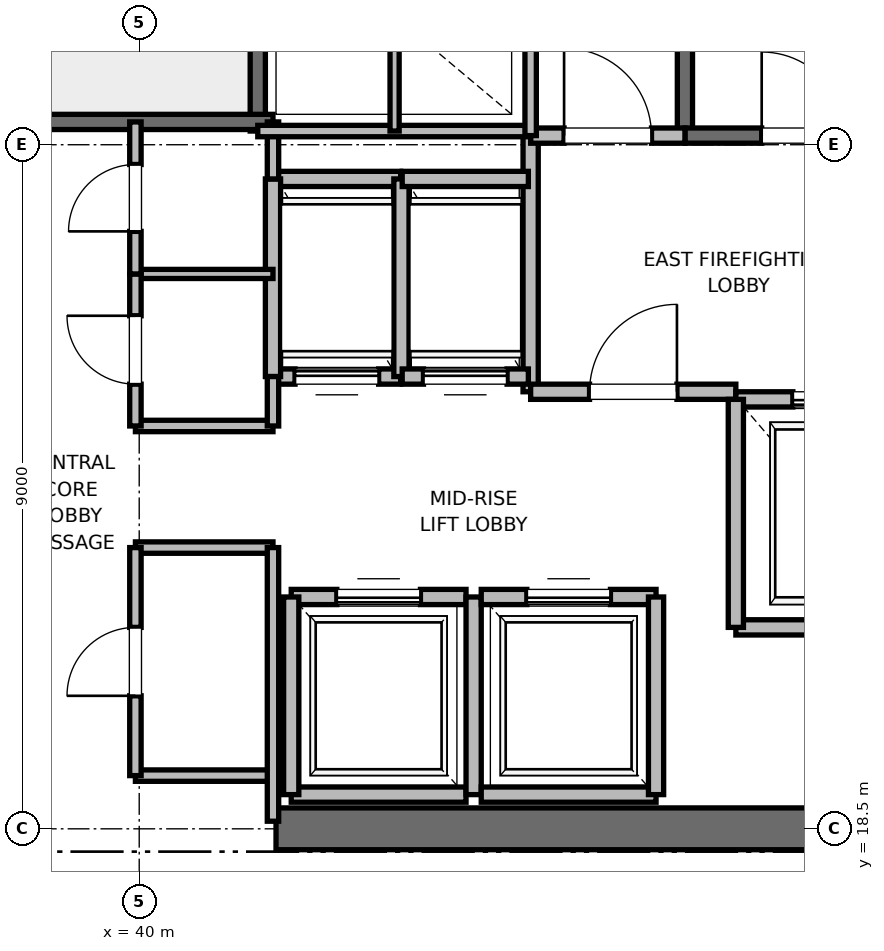
"""IFC4 building model, lengths in metres.
Left out: names, types, materials, properties, quantities, classifications, styles, units other than length and angle.
Written with IfcOpenShell. Run it as: python <this file> out.ifc"""

import sys

from ifc_helpers import new_model, si_unit, direction, frame, frame_2d, origin, place, context, subcontext, project, spatial, rectangle, extrude, element, fill, save


model = new_model("IFC4")
c1 = context("Model", 3, precision=1e-05, world=origin(), true_north=direction((0.0, 1.0)))
c2 = subcontext(c1, "Body", "Model", "MODEL_VIEW")
j1 = project(units=[si_unit("LENGTHUNIT", "METRE"), si_unit("PLANEANGLEUNIT", "RADIAN")], contexts=[c1])
p1 = place(None, origin())
s1 = spatial("IfcSite", under=j1, at=p1, CompositionType="ELEMENT")
p2 = place(p1, origin())
s2 = spatial("IfcBuilding", under=s1, at=p2, CompositionType="ELEMENT")
p3 = place(p2, frame((0.0, 0.0, 205.2)))
s3 = spatial("IfcBuildingStorey", under=s2, at=p3, CompositionType="ELEMENT", Elevation=205.2)
p4 = place(p3, frame((41.8, 18.5, 0.0), z_axis=(0.0, 0.0, 1.0), x_axis=(1.0, 0.0, 0.0)))
e1 = element("IfcWall", 1, at=p4, inside=s3, PredefinedType="SHEAR", context=c2, shape_type="SweptSolid", body=[
    extrude(rectangle(XDim=9.2, YDim=0.55, at=frame_2d((4.6, 0.0))), origin(), (0.0, 0.0, 1.0), 3.775),
])
p5 = place(p3, frame((47.18, 27.62, 0.0), z_axis=(0.0, 0.0, 1.0), x_axis=(0.0, 1.0, 0.0)))
e2 = element("IfcWall", 2, at=p5, inside=s3, PredefinedType="SOLIDWALL", context=c2, shape_type="SweptSolid", body=[
    extrude(rectangle(XDim=8.18, YDim=0.2, at=frame_2d((4.09, 0.0))), origin(), (0.0, 0.0, 1.0), 3.775),
])
p6 = place(p3, frame((47.18, 27.62, 0.0), z_axis=(0.0, 0.0, 1.0), x_axis=(1.0, 0.0, 0.0)))
e3 = element("IfcWall", 3, at=p6, inside=s3, PredefinedType="SOLIDWALL", context=c2, shape_type="SweptSolid", body=[
    extrude(rectangle(XDim=3.12, YDim=0.2, at=frame_2d((1.56, 0.0))), origin(), (0.0, 0.0, 1.0), 3.775),
])
p7 = place(p6, frame((1.01, 0.0, 0.0)))
e4 = element("IfcOpeningElement", 4, at=p7, cuts=e3, PredefinedType="OPENING", context=c2, shape_type="SweptSolid", body=[
    extrude(rectangle(XDim=1.1, YDim=2.15, at=frame_2d((0.55, 1.075))), frame((0.0, 0.1, 0.0), z_axis=(0.0, -1.0, 0.0), x_axis=(1.0, 0.0, 0.0)), (0.0, 0.0, 1.0), 0.2),
])
p8 = place(p3, frame((41.56, 27.68, 0.0), z_axis=(0.0, 0.0, 1.0), x_axis=(0.0, 1.0, 0.0)))
e5 = element("IfcWall", 5, at=p8, inside=s3, PredefinedType="SOLIDWALL", context=c2, shape_type="SweptSolid", body=[
    extrude(rectangle(XDim=8.57, YDim=0.2, at=frame_2d((4.285, 0.0))), origin(), (0.0, 0.0, 1.0), 3.775),
])
p9 = place(p3, frame((38.44, 27.8, 0.0), z_axis=(0.0, 0.0, 1.0), x_axis=(1.0, 0.0, 0.0)))
e6 = element("IfcWall", 6, at=p9, inside=s3, PredefinedType="SOLIDWALL", context=c2, shape_type="SweptSolid", body=[
    extrude(rectangle(XDim=3.32, YDim=0.2, at=frame_2d((1.66, 0.0))), origin(), (0.0, 0.0, 1.0), 3.775),
])
p10 = place(p3, frame((45.15, 24.25, 0.0), z_axis=(0.0, 0.0, 1.0), x_axis=(0.0, 1.0, 0.0)))
e7 = element("IfcWall", 7, at=p10, inside=s3, PredefinedType="PARTITIONING", context=c2, shape_type="SweptSolid", body=[
    extrude(rectangle(XDim=3.37, YDim=0.2, at=frame_2d((1.685, 0.0))), origin(), (0.0, 0.0, 1.0), 3.775),
])
p11 = place(p3, frame((45.15, 24.25, 0.0), z_axis=(0.0, 0.0, 1.0), x_axis=(1.0, 0.0, 0.0)))
e8 = element("IfcWall", 8, at=p11, inside=s3, PredefinedType="PARTITIONING", context=c2, shape_type="SweptSolid", body=[
    extrude(rectangle(XDim=2.7, YDim=0.2, at=frame_2d((1.35, 0.0))), origin(), (0.0, 0.0, 1.0), 3.775),
])
p12 = place(p11, frame((0.775, 0.0, 0.0)))
e9 = element("IfcOpeningElement", 9, at=p12, cuts=e8, PredefinedType="OPENING", context=c2, shape_type="SweptSolid", body=[
    extrude(rectangle(XDim=1.15, YDim=2.2, at=frame_2d((0.575, 1.1))), frame((0.0, 0.1, 0.0), z_axis=(0.0, -1.0, 0.0), x_axis=(1.0, 0.0, 0.0)), (0.0, 0.0, 1.0), 0.2),
])
p13 = place(p3, frame((45.15, 27.62, 0.0), z_axis=(0.0, 0.0, 1.0), x_axis=(1.0, 0.0, 0.0)))
e10 = element("IfcWall", 10, at=p13, inside=s3, PredefinedType="PARTITIONING", context=c2, shape_type="SweptSolid", body=[
    extrude(rectangle(XDim=2.03, YDim=0.2, at=frame_2d((1.015, 0.0))), origin(), (0.0, 0.0, 1.0), 3.775),
])
p14 = place(p13, frame((0.44, 0.0, 0.0)))
e11 = element("IfcOpeningElement", 11, at=p14, cuts=e10, PredefinedType="OPENING", context=c2, shape_type="SweptSolid", body=[
    extrude(rectangle(XDim=1.15, YDim=2.2, at=frame_2d((0.575, 1.1))), frame((0.0, 0.1, 0.0), z_axis=(0.0, -1.0, 0.0), x_axis=(1.0, 0.0, 0.0)), (0.0, 0.0, 1.0), 0.2),
])
p15 = place(p3, frame((47.85, 21.15, 0.0), z_axis=(0.0, 0.0, 1.0), x_axis=(1.0, 0.0, 0.0)))
e12 = element("IfcWall", 12, at=p15, inside=s3, PredefinedType="SOLIDWALL", context=c2, shape_type="SweptSolid", body=[
    extrude(rectangle(XDim=2.6, YDim=0.2, at=frame_2d((1.3, 0.0))), origin(), (0.0, 0.0, 1.0), 3.775),
])
p16 = place(p3, frame((50.45, 24.15, 0.0), z_axis=(0.0, 0.0, 1.0), x_axis=(-1.0, 0.0, 0.0)))
e13 = element("IfcWall", 13, at=p16, inside=s3, PredefinedType="SOLIDWALL", context=c2, shape_type="SweptSolid", body=[
    extrude(rectangle(XDim=2.6, YDim=0.2, at=frame_2d((1.3, 0.0))), origin(), (0.0, 0.0, 1.0), 2.755),
])
p17 = place(p16, frame((0.75, 0.0, 0.0)))
e14 = element("IfcOpeningElement", 14, at=p17, cuts=e13, PredefinedType="OPENING", context=c2, shape_type="SweptSolid", body=[
    extrude(rectangle(XDim=1.1, YDim=2.2, at=frame_2d((0.55, 1.1))), frame((0.0, 0.1, 0.0), z_axis=(0.0, -1.0, 0.0), x_axis=(1.0, 0.0, 0.0)), (0.0, 0.0, 1.0), 0.2),
])
p18 = place(p3, frame((47.85, 24.15, 0.0), z_axis=(0.0, 0.0, 1.0), x_axis=(0.0, -1.0, 0.0)))
e15 = element("IfcWall", 15, at=p18, inside=s3, PredefinedType="SOLIDWALL", context=c2, shape_type="SweptSolid", body=[
    extrude(rectangle(XDim=3.0, YDim=0.2, at=frame_2d((1.5, 0.0))), origin(), (0.0, 0.0, 1.0), 3.775),
])
p19 = place(p3, frame((42.0, 18.95, 0.0), z_axis=(0.0, 0.0, 1.0), x_axis=(1.0, 0.0, 0.0)))
e16 = element("IfcWall", 16, at=p19, inside=s3, PredefinedType="SOLIDWALL", context=c2, shape_type="SweptSolid", body=[
    extrude(rectangle(XDim=2.3, YDim=0.2, at=frame_2d((1.15, 0.0))), origin(), (0.0, 0.0, 1.0), 2.755),
])
p20 = place(p3, frame((44.3, 21.55, 0.0), z_axis=(0.0, 0.0, 1.0), x_axis=(-1.0, 0.0, 0.0)))
e17 = element("IfcWall", 17, at=p20, inside=s3, PredefinedType="SOLIDWALL", context=c2, shape_type="SweptSolid", body=[
    extrude(rectangle(XDim=2.3, YDim=0.2, at=frame_2d((1.15, 0.0))), origin(), (0.0, 0.0, 1.0), 3.775),
])
p21 = place(p20, frame((0.6, 0.0, 0.0)))
e18 = element("IfcOpeningElement", 18, at=p21, cuts=e17, PredefinedType="OPENING", context=c2, shape_type="SweptSolid", body=[
    extrude(rectangle(XDim=1.1, YDim=2.2, at=frame_2d((0.55, 1.1))), frame((0.0, 0.1, 0.0), z_axis=(0.0, -1.0, 0.0), x_axis=(1.0, 0.0, 0.0)), (0.0, 0.0, 1.0), 0.2),
])
p22 = place(p3, frame((42.0, 21.55, 0.0), z_axis=(0.0, 0.0, 1.0), x_axis=(0.0, -1.0, 0.0)))
e19 = element("IfcWall", 19, at=p22, inside=s3, PredefinedType="SOLIDWALL", context=c2, shape_type="SweptSolid", body=[
    extrude(rectangle(XDim=2.6, YDim=0.2, at=frame_2d((1.3, 0.0))), origin(), (0.0, 0.0, 1.0), 2.755),
])
p23 = place(p3, frame((44.4, 18.95, 0.0), z_axis=(0.0, 0.0, 1.0), x_axis=(0.0, 1.0, 0.0)))
e20 = element("IfcWall", 20, at=p23, inside=s3, PredefinedType="SOLIDWALL", context=c2, shape_type="SweptSolid", body=[
    extrude(rectangle(XDim=2.6, YDim=0.2, at=frame_2d((1.3, 0.0))), origin(), (0.0, 0.0, 1.0), 3.775),
])
p24 = place(p3, frame((44.5, 18.95, 0.0), z_axis=(0.0, 0.0, 1.0), x_axis=(1.0, 0.0, 0.0)))
e21 = element("IfcWall", 21, at=p24, inside=s3, PredefinedType="SOLIDWALL", context=c2, shape_type="SweptSolid", body=[
    extrude(rectangle(XDim=2.3, YDim=0.2, at=frame_2d((1.15, 0.0))), origin(), (0.0, 0.0, 1.0), 3.775),
])
p25 = place(p3, frame((46.8, 21.55, 0.0), z_axis=(0.0, 0.0, 1.0), x_axis=(-1.0, 0.0, 0.0)))
e22 = element("IfcWall", 22, at=p25, inside=s3, PredefinedType="SOLIDWALL", context=c2, shape_type="SweptSolid", body=[
    extrude(rectangle(XDim=2.3, YDim=0.2, at=frame_2d((1.15, 0.0))), origin(), (0.0, 0.0, 1.0), 3.775),
])
p26 = place(p25, frame((0.6, 0.0, 0.0)))
e23 = element("IfcOpeningElement", 23, at=p26, cuts=e22, PredefinedType="OPENING", context=c2, shape_type="SweptSolid", body=[
    extrude(rectangle(XDim=1.1, YDim=2.2, at=frame_2d((0.55, 1.1))), frame((0.0, 0.1, 0.0), z_axis=(0.0, -1.0, 0.0), x_axis=(1.0, 0.0, 0.0)), (0.0, 0.0, 1.0), 0.2),
])
p27 = place(p3, frame((46.8, 18.95, 0.0), z_axis=(0.0, 0.0, 1.0), x_axis=(0.0, 1.0, 0.0)))
e24 = element("IfcWall", 24, at=p27, inside=s3, PredefinedType="SOLIDWALL", context=c2, shape_type="SweptSolid", body=[
    extrude(rectangle(XDim=2.6, YDim=0.2, at=frame_2d((1.3, 0.0))), origin(), (0.0, 0.0, 1.0), 3.775),
])
p28 = place(p3, frame((41.76, 24.45, 0.0), z_axis=(0.0, 0.0, 1.0), x_axis=(1.0, 0.0, 0.0)))
e25 = element("IfcWall", 25, at=p28, inside=s3, PredefinedType="SOLIDWALL", context=c2, shape_type="SweptSolid", body=[
    extrude(rectangle(XDim=1.68, YDim=0.2, at=frame_2d((0.84, 0.0))), origin(), (0.0, 0.0, 1.0), 3.775),
])
p29 = place(p28, frame((0.29, 0.0, 0.0)))
e26 = element("IfcOpeningElement", 26, at=p29, cuts=e25, PredefinedType="OPENING", context=c2, shape_type="SweptSolid", body=[
    extrude(rectangle(XDim=1.1, YDim=2.2, at=frame_2d((0.55, 1.1))), frame((0.0, 0.1, 0.0), z_axis=(0.0, -1.0, 0.0), x_axis=(1.0, 0.0, 0.0)), (0.0, 0.0, 1.0), 0.2),
])
p30 = place(p3, frame((43.44, 27.05, 0.0), z_axis=(0.0, 0.0, 1.0), x_axis=(-1.0, 0.0, 0.0)))
e27 = element("IfcWall", 27, at=p30, inside=s3, PredefinedType="SOLIDWALL", context=c2, shape_type="SweptSolid", body=[
    extrude(rectangle(XDim=1.68, YDim=0.2, at=frame_2d((0.84, 0.0))), origin(), (0.0, 0.0, 1.0), 3.775),
])
for number, where, z_axis, x_axis in (
    (28, (41.76, 27.05, 0.0), (0.0, 0.0, 1.0), (0.0, -1.0, 0.0)),
    (29, (43.45, 24.45, 0.0), (0.0, 0.0, 1.0), (0.0, 1.0, 0.0)),
):
    element("IfcWall", number, at=place(p3, frame(where, z_axis=z_axis, x_axis=x_axis)), inside=s3, PredefinedType="SOLIDWALL", context=c2, shape_type="SweptSolid", body=[
        extrude(rectangle(XDim=2.6, YDim=0.2, at=frame_2d((1.3, 0.0))), origin(), (0.0, 0.0, 1.0), 3.775),
    ])
p31 = place(p3, frame((43.46, 24.45, 0.0), z_axis=(0.0, 0.0, 1.0), x_axis=(1.0, 0.0, 0.0)))
e30 = element("IfcWall", 30, at=p31, inside=s3, PredefinedType="SOLIDWALL", context=c2, shape_type="SweptSolid", body=[
    extrude(rectangle(XDim=1.66, YDim=0.2, at=frame_2d((0.83, 0.0))), origin(), (0.0, 0.0, 1.0), 3.775),
])
p32 = place(p31, frame((0.28, 0.0, 0.0)))
e31 = element("IfcOpeningElement", 31, at=p32, cuts=e30, PredefinedType="OPENING", context=c2, shape_type="SweptSolid", body=[
    extrude(rectangle(XDim=1.1, YDim=2.2, at=frame_2d((0.55, 1.1))), frame((0.0, 0.1, 0.0), z_axis=(0.0, -1.0, 0.0), x_axis=(1.0, 0.0, 0.0)), (0.0, 0.0, 1.0), 0.2),
])
p33 = place(p3, frame((45.12, 27.05, 0.0), z_axis=(0.0, 0.0, 1.0), x_axis=(-1.0, 0.0, 0.0)))
e32 = element("IfcWall", 32, at=p33, inside=s3, PredefinedType="SOLIDWALL", context=c2, shape_type="SweptSolid", body=[
    extrude(rectangle(XDim=1.66, YDim=0.2, at=frame_2d((0.83, 0.0))), origin(), (0.0, 0.0, 1.0), 3.775),
])
for number, where, z_axis, x_axis in (
    (33, (39.95, 19.2, 0.0), (0.0, 0.0, 1.0), (1.0, 0.0, 0.0)),
    (34, (39.95, 22.2, 0.0), (0.0, 0.0, 1.0), (1.0, 0.0, 0.0)),
    (35, (39.95, 23.8, 0.0), (0.0, 0.0, 1.0), (1.0, 0.0, 0.0)),
):
    element("IfcWall", number, at=place(p3, frame(where, z_axis=z_axis, x_axis=x_axis)), inside=s3, PredefinedType="PARTITIONING", context=c2, shape_type="SweptSolid", body=[
        extrude(rectangle(XDim=1.81, YDim=0.15, at=frame_2d((0.905, 0.0))), origin(), (0.0, 0.0, 1.0), 2.85),
    ])
p34 = place(p3, frame((39.95, 25.8, 0.0), z_axis=(0.0, 0.0, 1.0), x_axis=(1.0, 0.0, 0.0)))
e36 = element("IfcWall", 36, at=p34, inside=s3, PredefinedType="PARTITIONING", context=c2, shape_type="SweptSolid", body=[
    extrude(rectangle(XDim=1.81, YDim=0.12, at=frame_2d((0.905, 0.0))), origin(), (0.0, 0.0, 1.0), 2.85),
])
p35 = place(p3, frame((41.76, 18.6, 0.0), z_axis=(0.0, 0.0, 1.0), x_axis=(0.0, 1.0, 0.0)))
e37 = element("IfcWall", 37, at=p35, inside=s3, PredefinedType="PARTITIONING", context=c2, shape_type="SweptSolid", body=[
    extrude(rectangle(XDim=3.6, YDim=0.15, at=frame_2d((1.8, 0.0))), origin(), (0.0, 0.0, 1.0), 2.755),
])
p36 = place(p3, frame((41.76, 23.8, 0.0), z_axis=(0.0, 0.0, 1.0), x_axis=(0.0, 1.0, 0.0)))
e38 = element("IfcWall", 38, at=p36, inside=s3, PredefinedType="PARTITIONING", context=c2, shape_type="SweptSolid", body=[
    extrude(rectangle(XDim=0.65, YDim=0.15, at=frame_2d((0.325, 0.0))), origin(), (0.0, 0.0, 1.0), 2.85),
])
p37 = place(p3, frame((41.76, 27.05, 0.0), z_axis=(0.0, 0.0, 1.0), x_axis=(0.0, 1.0, 0.0)))
e39 = element("IfcWall", 39, at=p37, inside=s3, PredefinedType="PARTITIONING", context=c2, shape_type="SweptSolid", body=[
    extrude(rectangle(XDim=0.75, YDim=0.15, at=frame_2d((0.375, 0.0))), origin(), (0.0, 0.0, 1.0), 2.85),
])
p38 = place(p3, frame((39.95, 19.2, 0.0), z_axis=(0.0, 0.0, 1.0), x_axis=(0.0, 1.0, 0.0)))
e40 = element("IfcWall", 40, at=p38, inside=s3, PredefinedType="PARTITIONING", context=c2, shape_type="SweptSolid", body=[
    extrude(rectangle(XDim=3.0, YDim=0.15, at=frame_2d((1.5, 0.0))), origin(), (0.0, 0.0, 1.0), 2.85),
])
p39 = place(p38, frame((1.05, 0.0, 0.0)))
e41 = element("IfcOpeningElement", 41, at=p39, cuts=e40, PredefinedType="OPENING", context=c2, shape_type="SweptSolid", body=[
    extrude(rectangle(XDim=0.9, YDim=2.1, at=frame_2d((0.45, 1.05))), frame((0.0, 0.075, 0.0), z_axis=(0.0, -1.0, 0.0), x_axis=(1.0, 0.0, 0.0)), (0.0, 0.0, 1.0), 0.15),
])
p40 = place(p3, frame((39.95, 23.8, 0.0), z_axis=(0.0, 0.0, 1.0), x_axis=(0.0, 1.0, 0.0)))
e42 = element("IfcWall", 42, at=p40, inside=s3, PredefinedType="PARTITIONING", context=c2, shape_type="SweptSolid", body=[
    extrude(rectangle(XDim=2.0, YDim=0.15, at=frame_2d((1.0, 0.0))), origin(), (0.0, 0.0, 1.0), 2.85),
])
p41 = place(p40, frame((0.55, 0.0, 0.0)))
e43 = element("IfcOpeningElement", 43, at=p41, cuts=e42, PredefinedType="OPENING", context=c2, shape_type="SweptSolid", body=[
    extrude(rectangle(XDim=0.9, YDim=2.1, at=frame_2d((0.45, 1.05))), frame((0.0, 0.075, 0.0), z_axis=(0.0, -1.0, 0.0), x_axis=(1.0, 0.0, 0.0)), (0.0, 0.0, 1.0), 0.15),
])
p42 = place(p3, frame((39.95, 25.8, 0.0), z_axis=(0.0, 0.0, 1.0), x_axis=(0.0, 1.0, 0.0)))
e44 = element("IfcWall", 44, at=p42, inside=s3, PredefinedType="PARTITIONING", context=c2, shape_type="SweptSolid", body=[
    extrude(rectangle(XDim=2.0, YDim=0.15, at=frame_2d((1.0, 0.0))), origin(), (0.0, 0.0, 1.0), 2.85),
])
p43 = place(p42, frame((0.56, 0.0, 0.0)))
e45 = element("IfcOpeningElement", 45, at=p43, cuts=e44, PredefinedType="OPENING", context=c2, shape_type="SweptSolid", body=[
    extrude(rectangle(XDim=0.88, YDim=2.1, at=frame_2d((0.44, 1.05))), frame((0.0, 0.075, 0.0), z_axis=(0.0, -1.0, 0.0), x_axis=(1.0, 0.0, 0.0)), (0.0, 0.0, 1.0), 0.15),
])
p44 = place(p3, frame((41.56, 27.68, 0.0), z_axis=(0.0, 0.0, 1.0), x_axis=(1.0, 0.0, 0.0)))
e46 = element("IfcWall", 46, at=p44, inside=s3, PredefinedType="PARTITIONING", context=c2, shape_type="SweptSolid", body=[
    extrude(rectangle(XDim=3.59, YDim=0.15, at=frame_2d((1.795, 0.0))), origin(), (0.0, 0.0, 1.0), 2.85),
])
p45 = place(p3, frame((45.15, 27.62, 0.0), z_axis=(0.0, 0.0, 1.0), x_axis=(0.0, 1.0, 0.0)))
e47 = element("IfcWall", 47, at=p45, inside=s3, PredefinedType="PARTITIONING", context=c2, shape_type="SweptSolid", body=[
    extrude(rectangle(XDim=3.1, YDim=0.15, at=frame_2d((1.55, 0.0))), origin(), (0.0, 0.0, 1.0), 2.85),
])
p46 = place(p3, frame((43.36, 27.68, 0.0), z_axis=(0.0, 0.0, 1.0), x_axis=(0.0, 1.0, 0.0)))
e48 = element("IfcWall", 48, at=p46, inside=s3, PredefinedType="PARTITIONING", context=c2, shape_type="SweptSolid", body=[
    extrude(rectangle(XDim=3.04, YDim=0.12, at=frame_2d((1.52, 0.0))), origin(), (0.0, 0.0, 1.0), 2.85),
])
p47 = place(p7, origin())
e49 = element("IfcDoor", 49, at=p47, inside=s3, OperationType="SINGLE_SWING_LEFT", PredefinedType="DOOR", context=c2, shape_type="SweptSolid", body=[
    extrude(rectangle(XDim=1.1, YDim=2.15, at=frame_2d((0.55, 1.075))), frame((0.0, 0.025, 0.0), z_axis=(0.0, -1.0, 0.0), x_axis=(1.0, 0.0, 0.0)), (0.0, 0.0, 1.0), 0.05),
])
fill(e4, e49)
p48 = place(p12, origin())
e50 = element("IfcDoor", 50, at=p48, inside=s3, OperationType="SINGLE_SWING_RIGHT", PredefinedType="DOOR", context=c2, shape_type="SweptSolid", body=[
    extrude(rectangle(XDim=1.15, YDim=2.2, at=frame_2d((0.575, 1.1))), frame((0.0, 0.025, 0.0), z_axis=(0.0, -1.0, 0.0), x_axis=(1.0, 0.0, 0.0)), (0.0, 0.0, 1.0), 0.05),
])
fill(e9, e50)
p49 = place(p14, origin())
e51 = element("IfcDoor", 51, at=p49, inside=s3, OperationType="SINGLE_SWING_LEFT", PredefinedType="DOOR", context=c2, shape_type="SweptSolid", body=[
    extrude(rectangle(XDim=1.15, YDim=2.2, at=frame_2d((0.575, 1.1))), frame((0.0, 0.025, 0.0), z_axis=(0.0, -1.0, 0.0), x_axis=(1.0, 0.0, 0.0)), (0.0, 0.0, 1.0), 0.05),
])
fill(e11, e51)
p50 = place(p17, origin())
e52 = element("IfcDoor", 52, at=p50, inside=s3, OperationType="SLIDING_TO_RIGHT", PredefinedType="DOOR", context=c2, shape_type="SweptSolid", body=[
    extrude(rectangle(XDim=1.1, YDim=2.2, at=frame_2d((0.55, 1.1))), frame((0.0, 0.025, 0.0), z_axis=(0.0, -1.0, 0.0), x_axis=(1.0, 0.0, 0.0)), (0.0, 0.0, 1.0), 0.05),
])
fill(e14, e52)
p51 = place(p21, origin())
e53 = element("IfcDoor", 53, at=p51, inside=s3, OperationType="SLIDING_TO_RIGHT", PredefinedType="DOOR", context=c2, shape_type="SweptSolid", body=[
    extrude(rectangle(XDim=1.1, YDim=2.2, at=frame_2d((0.55, 1.1))), frame((0.0, 0.025, 0.0), z_axis=(0.0, -1.0, 0.0), x_axis=(1.0, 0.0, 0.0)), (0.0, 0.0, 1.0), 0.05),
])
fill(e18, e53)
p52 = place(p26, origin())
e54 = element("IfcDoor", 54, at=p52, inside=s3, OperationType="SLIDING_TO_RIGHT", PredefinedType="DOOR", context=c2, shape_type="SweptSolid", body=[
    extrude(rectangle(XDim=1.1, YDim=2.2, at=frame_2d((0.55, 1.1))), frame((0.0, 0.025, 0.0), z_axis=(0.0, -1.0, 0.0), x_axis=(1.0, 0.0, 0.0)), (0.0, 0.0, 1.0), 0.05),
])
fill(e23, e54)
p53 = place(p29, origin())
e55 = element("IfcDoor", 55, at=p53, inside=s3, OperationType="SLIDING_TO_RIGHT", PredefinedType="DOOR", context=c2, shape_type="SweptSolid", body=[
    extrude(rectangle(XDim=1.1, YDim=2.2, at=frame_2d((0.55, 1.1))), frame((0.0, 0.025, 0.0), z_axis=(0.0, -1.0, 0.0), x_axis=(1.0, 0.0, 0.0)), (0.0, 0.0, 1.0), 0.05),
])
fill(e26, e55)
p54 = place(p32, origin())
e56 = element("IfcDoor", 56, at=p54, inside=s3, OperationType="SLIDING_TO_RIGHT", PredefinedType="DOOR", context=c2, shape_type="SweptSolid", body=[
    extrude(rectangle(XDim=1.1, YDim=2.2, at=frame_2d((0.55, 1.1))), frame((0.0, 0.025, 0.0), z_axis=(0.0, -1.0, 0.0), x_axis=(1.0, 0.0, 0.0)), (0.0, 0.0, 1.0), 0.05),
])
fill(e31, e56)
p55 = place(p39, origin())
e57 = element("IfcDoor", 57, at=p55, inside=s3, OperationType="SINGLE_SWING_LEFT", PredefinedType="DOOR", context=c2, shape_type="SweptSolid", body=[
    extrude(rectangle(XDim=0.9, YDim=2.1, at=frame_2d((0.45, 1.05))), frame((0.0, 0.025, 0.0), z_axis=(0.0, -1.0, 0.0), x_axis=(1.0, 0.0, 0.0)), (0.0, 0.0, 1.0), 0.05),
])
fill(e41, e57)
p56 = place(p41, origin())
e58 = element("IfcDoor", 58, at=p56, inside=s3, OperationType="SINGLE_SWING_RIGHT", PredefinedType="DOOR", context=c2, shape_type="SweptSolid", body=[
    extrude(rectangle(XDim=0.9, YDim=2.1, at=frame_2d((0.45, 1.05))), frame((0.0, 0.025, 0.0), z_axis=(0.0, -1.0, 0.0), x_axis=(1.0, 0.0, 0.0)), (0.0, 0.0, 1.0), 0.05),
])
fill(e43, e58)
p57 = place(p43, origin())
e59 = element("IfcDoor", 59, at=p57, inside=s3, OperationType="SINGLE_SWING_LEFT", PredefinedType="DOOR", context=c2, shape_type="SweptSolid", body=[
    extrude(rectangle(XDim=0.88, YDim=2.1, at=frame_2d((0.44, 1.05))), frame((0.0, 0.025, 0.0), z_axis=(0.0, -1.0, 0.0), x_axis=(1.0, 0.0, 0.0)), (0.0, 0.0, 1.0), 0.05),
])
fill(e45, e59)
save(model, sys.argv[1])
